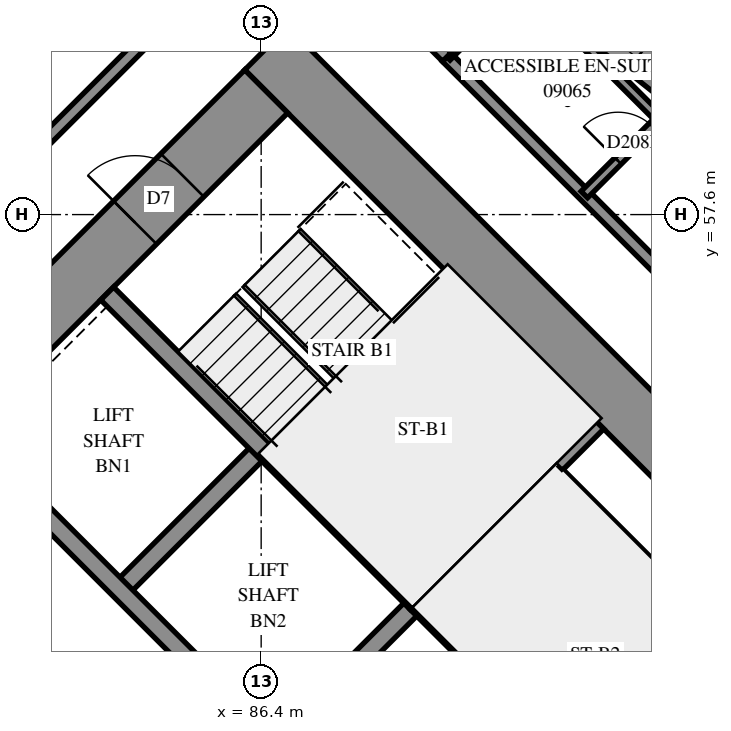
"""IFC4 building model, lengths in metres.
Left out: names, types, materials, properties, quantities, classifications, styles, units other than length and angle.
Written with IfcOpenShell. Run it as: python <this file> out.ifc"""

import sys

from ifc_helpers import new_model, si_unit, direction, frame, frame_2d, origin, place, context, subcontext, project, spatial, polyline, rectangle, outline, extrude, element, fill, save


model = new_model("IFC4")
c1 = context("Model", 3, precision=1e-05, world=origin(), true_north=direction((0.0, 1.0)))
c2 = subcontext(c1, "Body", "Model", "MODEL_VIEW")
j1 = project(units=[si_unit("LENGTHUNIT", "METRE"), si_unit("PLANEANGLEUNIT", "RADIAN")], contexts=[c1])
p1 = place(None, origin())
s1 = spatial("IfcSite", under=j1, at=p1, CompositionType="ELEMENT")
p2 = place(p1, origin())
s2 = spatial("IfcBuilding", under=s1, at=p2, CompositionType="ELEMENT")
p3 = place(p2, frame((0.0, 0.0, 37.2)))
s3 = spatial("IfcBuildingStorey", under=s2, at=p3, CompositionType="ELEMENT", Elevation=37.2)
p4 = place(p3, frame((86.483, 60.333, -0.3), z_axis=(0.0, 0.0, 1.0), x_axis=(0.70710983, -0.7071037324, 0.0)))
e1 = element("IfcWall", 1, at=p4, inside=s3, PredefinedType="SHEAR", context=c2, shape_type="SweptSolid", body=[
    extrude(rectangle(XDim=16.4, YDim=1.0, at=frame_2d((8.2, 0.0))), origin(), (0.0, 0.0, 1.0), 2.7),
])
p5 = place(p4, frame((11.0, 0.0, 0.3)))
e2 = element("IfcOpeningElement", 2, at=p5, cuts=e1, PredefinedType="OPENING", context=c2, shape_type="SweptSolid", body=[
    extrude(rectangle(XDim=0.8, YDim=2.1, at=frame_2d((0.4, 1.05))), frame((0.0, 0.51, 0.0), z_axis=(0.0, -1.0, 0.0), x_axis=(1.0, 0.0, 0.0)), (0.0, 0.0, 1.0), 1.02),
])
p6 = place(p3, frame((76.301, 49.443, -0.3), z_axis=(0.0, 0.0, 1.0), x_axis=(0.7071067812, 0.7071067812, 0.0)))
e3 = element("IfcWall", 3, at=p6, inside=s3, PredefinedType="SHEAR", context=c2, shape_type="SweptSolid", body=[
    extrude(rectangle(XDim=14.4, YDim=1.0, at=frame_2d((7.2, 0.0))), origin(), (0.0, 0.0, 1.0), 2.7),
])
p7 = place(p6, frame((4.55, 0.0, 0.3)))
e4 = element("IfcOpeningElement", 4, at=p7, cuts=e3, PredefinedType="OPENING", context=c2, shape_type="SweptSolid", body=[
    extrude(rectangle(XDim=1.1, YDim=2.1, at=frame_2d((0.55, 1.05))), frame((0.0, 0.51, 0.0), z_axis=(0.0, -1.0, 0.0), x_axis=(1.0, 0.0, 0.0)), (0.0, 0.0, 1.0), 1.02),
])
p8 = place(p6, frame((11.35, 0.0, 0.3)))
e5 = element("IfcOpeningElement", 5, at=p8, cuts=e3, PredefinedType="OPENING", context=c2, shape_type="SweptSolid", body=[
    extrude(rectangle(XDim=1.1, YDim=2.1, at=frame_2d((0.55, 1.05))), frame((0.0, 0.51, 0.0), z_axis=(0.0, -1.0, 0.0), x_axis=(1.0, 0.0, 0.0)), (0.0, 0.0, 1.0), 1.02),
])
p9 = place(p3, frame((84.079, 51.423, 0.0), z_axis=(0.0, 0.0, 1.0), x_axis=(0.7071219326, 0.7070916295, 0.0)))
e6 = element("IfcWall", 6, at=p9, inside=s3, PredefinedType="SOLIDWALL", context=c2, shape_type="SweptSolid", body=[
    extrude(rectangle(XDim=3.3, YDim=0.3, at=frame_2d((1.65, 0.0))), origin(), (0.0, 0.0, 1.0), 3.1),
])
p10 = place(p3, frame((86.625, 48.878, 0.0), z_axis=(0.0, 0.0, 1.0), x_axis=(0.7071067812, 0.7071067812, 0.0)))
e7 = element("IfcWall", 7, at=p10, inside=s3, PredefinedType="SOLIDWALL", context=c2, shape_type="SweptSolid", body=[
    extrude(rectangle(XDim=3.3, YDim=0.3, at=frame_2d((1.65, 0.0))), origin(), (0.0, 0.0, 1.0), 3.1),
])
p11 = place(p3, frame((78.988, 51.423, 0.0), z_axis=(0.0, 0.0, 1.0), x_axis=(0.7071067812, -0.7071067812, 0.0)))
e8 = element("IfcWall", 8, at=p11, inside=s3, PredefinedType="SOLIDWALL", context=c2, shape_type="SweptSolid", body=[
    extrude(rectangle(XDim=14.4, YDim=0.3, at=frame_2d((7.2, 0.0))), origin(), (0.0, 0.0, 1.0), 3.1),
])
p12 = place(p11, frame((1.25, 0.0, 0.0)))
e9 = element("IfcOpeningElement", 9, at=p12, cuts=e8, PredefinedType="OPENING", context=c2, shape_type="SweptSolid", body=[
    extrude(rectangle(XDim=1.1, YDim=2.1, at=frame_2d((0.55, 1.05))), frame((0.0, 0.16, 0.0), z_axis=(0.0, -1.0, 0.0), x_axis=(1.0, 0.0, 0.0)), (0.0, 0.0, 1.0), 0.32),
])
p13 = place(p11, frame((4.85, 0.0, 0.0)))
e10 = element("IfcOpeningElement", 10, at=p13, cuts=e8, PredefinedType="OPENING", context=c2, shape_type="SweptSolid", body=[
    extrude(rectangle(XDim=1.1, YDim=2.1, at=frame_2d((0.55, 1.05))), frame((0.0, 0.16, 0.0), z_axis=(0.0, -1.0, 0.0), x_axis=(1.0, 0.0, 0.0)), (0.0, 0.0, 1.0), 0.32),
])
p14 = place(p11, frame((8.45, 0.0, 0.0)))
e11 = element("IfcOpeningElement", 11, at=p14, cuts=e8, PredefinedType="OPENING", context=c2, shape_type="SweptSolid", body=[
    extrude(rectangle(XDim=1.1, YDim=2.1, at=frame_2d((0.55, 1.05))), frame((0.0, 0.16, 0.0), z_axis=(0.0, -1.0, 0.0), x_axis=(1.0, 0.0, 0.0)), (0.0, 0.0, 1.0), 0.32),
])
p15 = place(p11, frame((12.05, 0.0, 0.0)))
e12 = element("IfcOpeningElement", 12, at=p15, cuts=e8, PredefinedType="OPENING", context=c2, shape_type="SweptSolid", body=[
    extrude(rectangle(XDim=1.1, YDim=2.1, at=frame_2d((0.55, 1.05))), frame((0.0, 0.16, 0.0), z_axis=(0.0, -1.0, 0.0), x_axis=(1.0, 0.0, 0.0)), (0.0, 0.0, 1.0), 0.32),
])
p16 = place(p3, frame((81.534, 53.969, 0.0), z_axis=(0.0, 0.0, 1.0), x_axis=(0.707103309, -0.7071102534, 0.0)))
e13 = element("IfcWall", 13, at=p16, inside=s3, PredefinedType="SOLIDWALL", context=c2, shape_type="SweptSolid", body=[
    extrude(rectangle(XDim=14.4, YDim=0.3, at=frame_2d((7.2, 0.0))), origin(), (0.0, 0.0, 1.0), 3.1),
])
p17 = place(p16, frame((12.05, 0.0, 0.0)))
e14 = element("IfcOpeningElement", 14, at=p17, cuts=e13, PredefinedType="OPENING", context=c2, shape_type="SweptSolid", body=[
    extrude(rectangle(XDim=1.1, YDim=2.1, at=frame_2d((0.55, 1.05))), frame((0.0, 0.16, 0.0), z_axis=(0.0, -1.0, 0.0), x_axis=(1.0, 0.0, 0.0)), (0.0, 0.0, 1.0), 0.32),
])
for number, where, z_axis, x_axis in (
    (15, (83.867, 56.302, 0.0), (0.0, 0.0, 1.0), (0.707, -0.707, 0.0)),
    (16, (88.958, 51.211, 0.0), (0.0, 0.0, 1.0), (0.707, -0.707, 0.0)),
):
    element("IfcWall", number, at=place(p3, frame(where, z_axis=z_axis, x_axis=x_axis)), inside=s3, PredefinedType="SOLIDWALL", context=c2, shape_type="SweptSolid", body=[
        extrude(rectangle(XDim=7.2, YDim=0.3, at=frame_2d((3.6, 0.0))), origin(), (0.0, 0.0, 1.0), 3.1),
    ])
p18 = place(p3, frame((88.958, 51.211, 0.0), z_axis=(0.0, 0.0, 1.0), x_axis=(0.7071067812, 0.7071067812, 0.0)))
e17 = element("IfcWall", 17, at=p18, inside=s3, PredefinedType="SOLIDWALL", context=c2, shape_type="SweptSolid", body=[
    extrude(rectangle(XDim=4.2, YDim=0.3, at=frame_2d((2.1, 0.0))), origin(), (0.0, 0.0, 1.0), 3.1),
])
p19 = place(p3, frame((94.047, 59.011, 0.0), z_axis=(0.0, 0.0, 1.0), x_axis=(-0.7826141976, 0.6225070424, 0.0)))
e18 = element("IfcWall", 18, at=p19, inside=s3, PredefinedType="SOLIDWALL", context=c2, shape_type="SweptSolid", body=[
    extrude(outline(polyline([(-0.031, -0.275), (3.423, -0.275), (3.485, 0.275), (0.031, 0.275), (-0.031, -0.275)])), origin(), (0.0, 0.0, 1.0), 3.1),
])
p20 = place(p19, frame((1.874, 0.0, 0.5)))
e19 = element("IfcOpeningElement", 19, at=p20, cuts=e18, PredefinedType="OPENING", context=c2, shape_type="SweptSolid", body=[
    extrude(rectangle(XDim=1.2, YDim=2.45, at=frame_2d((0.6, 1.225))), frame((0.0, 0.285, 0.0), z_axis=(0.0, -1.0, 0.0), x_axis=(1.0, 0.0, 0.0)), (0.0, 0.0, 1.0), 0.57),
])
p21 = place(p3, frame((91.313, 53.354, 0.0), z_axis=(0.0, 0.0, 1.0), x_axis=(0.7071140275, -0.7070995348, 0.0)))
e20 = element("IfcWall", 20, at=p21, inside=s3, PredefinedType="PARTITIONING", context=c2, shape_type="SweptSolid", body=[
    extrude(rectangle(XDim=6.9, YDim=0.15, at=frame_2d((3.45, 0.0))), origin(), (0.0, 0.0, 1.0), 3.1),
])
p22 = place(p3, frame((79.871, 55.843, 0.0), z_axis=(0.0, 0.0, 1.0), x_axis=(0.7071067812, 0.7071067812, 0.0)))
e21 = element("IfcWall", 21, at=p22, inside=s3, PredefinedType="PARTITIONING", context=c2, shape_type="SweptSolid", body=[
    extrude(rectangle(XDim=9.85, YDim=0.2, at=frame_2d((4.925, 0.0))), origin(), (0.0, 0.0, 1.0), 3.1),
])
p23 = place(p22, frame((1.135, 0.0, 0.0)))
e22 = element("IfcOpeningElement", 22, at=p23, cuts=e21, PredefinedType="OPENING", context=c2, shape_type="SweptSolid", body=[
    extrude(rectangle(XDim=1.0, YDim=2.1, at=frame_2d((0.5, 1.05))), frame((0.0, 0.11, 0.0), z_axis=(0.0, -1.0, 0.0), x_axis=(1.0, 0.0, 0.0)), (0.0, 0.0, 1.0), 0.22),
])
p24 = place(p3, frame((89.451, 60.189, 0.0), z_axis=(0.0, 0.0, 1.0), x_axis=(0.7071796965, -0.7070338583, 0.0)))
e23 = element("IfcWall", 23, at=p24, inside=s3, PredefinedType="PARTITIONING", context=c2, shape_type="SweptSolid", body=[
    extrude(rectangle(XDim=9.6, YDim=0.2, at=frame_2d((4.8, 0.0))), origin(), (0.0, 0.0, 1.0), 3.1),
])
p25 = place(p24, frame((7.315, 0.0, 0.0)))
e24 = element("IfcOpeningElement", 24, at=p25, cuts=e23, PredefinedType="OPENING", context=c2, shape_type="SweptSolid", body=[
    extrude(rectangle(XDim=0.9, YDim=2.1, at=frame_2d((0.45, 1.05))), frame((0.0, 0.11, 0.0), z_axis=(0.0, -1.0, 0.0), x_axis=(1.0, 0.0, 0.0)), (0.0, 0.0, 1.0), 0.22),
])
p26 = place(p3, frame((91.246, 60.881, 0.0), z_axis=(0.0, 0.0, 1.0), x_axis=(0.7071274366, -0.7070861252, 0.0)))
e25 = element("IfcWall", 25, at=p26, inside=s3, PredefinedType="PARTITIONING", context=c2, shape_type="SweptSolid", body=[
    extrude(rectangle(XDim=2.421, YDim=0.15, at=frame_2d((1.21, 0.0))), origin(), (0.0, 0.0, 1.0), 3.1),
])
p27 = place(p3, frame((91.715, 57.929, 0.0), z_axis=(0.0, 0.0, 1.0), x_axis=(0.7071067812, 0.7071067812, 0.0)))
e26 = element("IfcWall", 26, at=p27, inside=s3, PredefinedType="PARTITIONING", context=c2, shape_type="SweptSolid", body=[
    extrude(rectangle(XDim=2.037, YDim=0.15, at=frame_2d((1.018, 0.0))), origin(), (0.0, 0.0, 1.0), 3.1),
])
p28 = place(p27, frame((0.784, 0.0, 0.0)))
e27 = element("IfcOpeningElement", 27, at=p28, cuts=e26, PredefinedType="OPENING", context=c2, shape_type="SweptSolid", body=[
    extrude(rectangle(XDim=0.8, YDim=2.1, at=frame_2d((0.4, 1.05))), frame((0.0, 0.085, 0.0), z_axis=(0.0, -1.0, 0.0), x_axis=(1.0, 0.0, 0.0)), (0.0, 0.0, 1.0), 0.17),
])
p29 = place(p3, frame((89.453, 60.193, 0.0), z_axis=(0.0, 0.0, 1.0), x_axis=(0.7071342593, 0.7070793021, 0.0)))
e28 = element("IfcWall", 28, at=p29, inside=s3, PredefinedType="PARTITIONING", context=c2, shape_type="SweptSolid", body=[
    extrude(rectangle(XDim=1.82, YDim=0.15, at=frame_2d((0.91, 0.0))), origin(), (0.0, 0.0, 1.0), 3.1),
])
p30 = place(p3, frame((88.603, 61.039, 0.0), z_axis=(0.0, 0.0, 1.0), x_axis=(0.7079391603, -0.7062734211, 0.0)))
e29 = element("IfcWall", 29, at=p30, inside=s3, PredefinedType="PARTITIONING", context=c2, shape_type="SweptSolid", body=[
    extrude(rectangle(XDim=1.201, YDim=0.2, at=frame_2d((0.6, 0.0))), origin(), (0.0, 0.0, 1.0), 3.1),
])
p31 = place(p20, origin())
e30 = element("IfcWindow", 30, at=p31, inside=s3, PartitioningType="SINGLE_PANEL", PredefinedType="WINDOW", context=c2, shape_type="SweptSolid", body=[
    extrude(rectangle(XDim=1.2, YDim=2.45, at=frame_2d((0.6, 1.225))), frame((0.0, 0.155, 0.0), z_axis=(0.0, -1.0, 0.0), x_axis=(1.0, 0.0, 0.0)), (0.0, 0.0, 1.0), 0.06),
])
fill(e19, e30)
p32 = place(p8, origin())
e31 = element("IfcDoor", 31, at=p32, inside=s3, OperationType="SINGLE_SWING_LEFT", PredefinedType="DOOR", context=c2, shape_type="SweptSolid", body=[
    extrude(rectangle(XDim=1.1, YDim=2.1, at=frame_2d((0.55, 1.05))), frame((0.0, 0.025, 0.0), z_axis=(0.0, -1.0, 0.0), x_axis=(1.0, 0.0, 0.0)), (0.0, 0.0, 1.0), 0.05),
])
fill(e5, e31)
p33 = place(p28, origin())
e32 = element("IfcDoor", 32, at=p33, inside=s3, OperationType="SINGLE_SWING_RIGHT", PredefinedType="DOOR", context=c2, shape_type="SweptSolid", body=[
    extrude(rectangle(XDim=0.8, YDim=2.1, at=frame_2d((0.4, 1.05))), frame((0.0, 0.025, 0.0), z_axis=(0.0, -1.0, 0.0), x_axis=(1.0, 0.0, 0.0)), (0.0, 0.0, 1.0), 0.05),
])
fill(e27, e32)
save(model, sys.argv[1])
